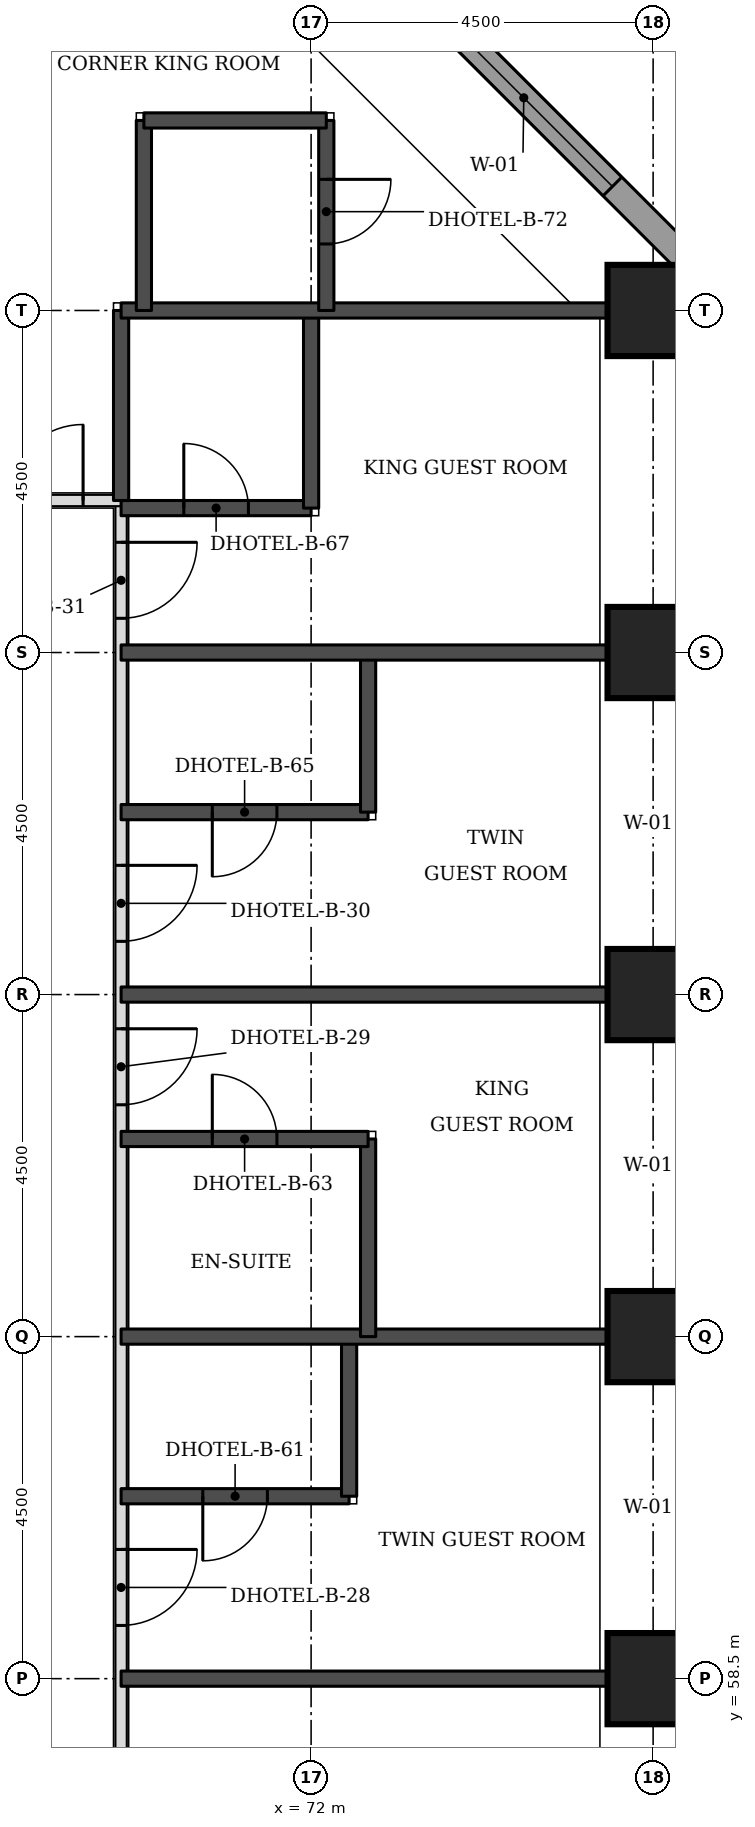
"""IFC4 building model, lengths in metres.
Left out: names, types, materials, properties, quantities, classifications, styles, units other than length and angle.
Written with IfcOpenShell. Run it as: python <this file> out.ifc"""

import sys

from ifc_helpers import new_model, si_unit, direction, frame, frame_2d, origin, origin_2d, place, context, subcontext, project, spatial, rectangle, extrude, element, fill, save


model = new_model("IFC4")
c1 = context("Model", 3, precision=1e-05, world=origin(), true_north=direction((0.0, 1.0)))
c2 = subcontext(c1, "Body", "Model", "MODEL_VIEW")
j1 = project(units=[si_unit("LENGTHUNIT", "METRE"), si_unit("PLANEANGLEUNIT", "RADIAN")], contexts=[c1])
p1 = place(None, origin())
s1 = spatial("IfcSite", under=j1, at=p1, CompositionType="ELEMENT")
p2 = place(p1, origin())
s2 = spatial("IfcBuilding", under=s1, at=p2, CompositionType="ELEMENT")
p3 = place(p2, frame((0.0, 0.0, 52.8)))
s3 = spatial("IfcBuildingStorey", under=s2, at=p3, CompositionType="ELEMENT", Elevation=52.8)
for number, where, z_axis, x_axis in (
    (1, (76.5, 58.5, 0.0), (0.0, 0.0, 1.0), (1.0, 0.0, 0.0)),
    (2, (76.5, 63.0, 0.0), (0.0, 0.0, 1.0), (1.0, 0.0, 0.0)),
    (3, (76.5, 67.5, 0.0), (0.0, 0.0, 1.0), (1.0, 0.0, 0.0)),
    (4, (76.5, 72.0, 0.0), (0.0, 0.0, 1.0), (1.0, 0.0, 0.0)),
    (5, (76.5, 76.5, 0.0), (0.0, 0.0, 1.0), (1.0, 0.0, 0.0)),
):
    element("IfcColumn", number, at=place(p3, frame(where, z_axis=z_axis, x_axis=x_axis)), inside=s3, PredefinedType="COLUMN", context=c2, shape_type="SweptSolid", body=[
        extrude(rectangle(XDim=1.2, YDim=1.2, at=origin_2d()), origin(), (0.0, 0.0, 1.0), 3.3),
    ])
p4 = place(p3, frame((77.326, 76.77, 0.0), z_axis=(0.0, 0.0, 1.0), x_axis=(-0.707106781187, 0.707106781187, 0.0)))
e6 = element("IfcWall", 6, at=p4, inside=s3, PredefinedType="STANDARD", context=c2, shape_type="SweptSolid", body=[
    extrude(rectangle(XDim=7.151, YDim=0.35, at=frame_2d((3.576, 0.0))), origin(), (0.0, 0.0, 1.0), 3.055),
])
p5 = place(p4, frame((1.926, 0.0, 0.8)))
e7 = element("IfcOpeningElement", 7, at=p5, cuts=e6, PredefinedType="OPENING", context=c2, shape_type="SweptSolid", body=[
    extrude(rectangle(XDim=3.3, YDim=1.5, at=frame_2d((1.65, 0.75))), frame((0.0, 0.185, 0.0), z_axis=(0.0, -1.0, 0.0), x_axis=(1.0, 0.0, 0.0)), (0.0, 0.0, 1.0), 0.37),
])
p6 = place(p3, frame((69.5, 47.5, 0.0), z_axis=(0.0, 0.0, 1.0), x_axis=(0.0, 1.0, 0.0)))
e8 = element("IfcWall", 8, at=p6, inside=s3, PredefinedType="PARTITIONING", context=c2, shape_type="SweptSolid", body=[
    extrude(rectangle(XDim=26.5, YDim=0.15, at=frame_2d((13.25, 0.0))), origin(), (0.0, 0.0, 1.0), 3.08),
])
p7 = place(p6, frame((24.95, 0.0, 0.0)))
e9 = element("IfcOpeningElement", 9, at=p7, cuts=e8, PredefinedType="OPENING", context=c2, shape_type="SweptSolid", body=[
    extrude(rectangle(XDim=1.0, YDim=2.1, at=frame_2d((0.5, 1.05))), frame((0.0, 0.085, 0.0), z_axis=(0.0, -1.0, 0.0), x_axis=(1.0, 0.0, 0.0)), (0.0, 0.0, 1.0), 0.17),
])
p8 = place(p6, frame((20.7, 0.0, 0.0)))
e10 = element("IfcOpeningElement", 10, at=p8, cuts=e8, PredefinedType="OPENING", context=c2, shape_type="SweptSolid", body=[
    extrude(rectangle(XDim=1.0, YDim=2.1, at=frame_2d((0.5, 1.05))), frame((0.0, 0.085, 0.0), z_axis=(0.0, -1.0, 0.0), x_axis=(1.0, 0.0, 0.0)), (0.0, 0.0, 1.0), 0.17),
])
p9 = place(p6, frame((18.55, 0.0, 0.0)))
e11 = element("IfcOpeningElement", 11, at=p9, cuts=e8, PredefinedType="OPENING", context=c2, shape_type="SweptSolid", body=[
    extrude(rectangle(XDim=1.0, YDim=2.1, at=frame_2d((0.5, 1.05))), frame((0.0, 0.085, 0.0), z_axis=(0.0, -1.0, 0.0), x_axis=(1.0, 0.0, 0.0)), (0.0, 0.0, 1.0), 0.17),
])
p10 = place(p6, frame((11.7, 0.0, 0.0)))
e12 = element("IfcOpeningElement", 12, at=p10, cuts=e8, PredefinedType="OPENING", context=c2, shape_type="SweptSolid", body=[
    extrude(rectangle(XDim=1.0, YDim=2.1, at=frame_2d((0.5, 1.05))), frame((0.0, 0.085, 0.0), z_axis=(0.0, -1.0, 0.0), x_axis=(1.0, 0.0, 0.0)), (0.0, 0.0, 1.0), 0.17),
])
p11 = place(p6, frame((7.65, 0.0, 0.0)))
e13 = element("IfcOpeningElement", 13, at=p11, cuts=e8, PredefinedType="OPENING", context=c2, shape_type="SweptSolid", body=[
    extrude(rectangle(XDim=1.1, YDim=2.1, at=frame_2d((0.55, 1.05))), frame((0.0, 0.085, 0.0), z_axis=(0.0, -1.0, 0.0), x_axis=(1.0, 0.0, 0.0)), (0.0, 0.0, 1.0), 0.17),
])
p12 = place(p6, frame((0.447, 0.0, 0.0)))
e14 = element("IfcOpeningElement", 14, at=p12, cuts=e8, PredefinedType="OPENING", context=c2, shape_type="SweptSolid", body=[
    extrude(rectangle(XDim=1.0, YDim=2.1, at=frame_2d((0.5, 1.05))), frame((0.0, 0.085, 0.0), z_axis=(0.0, -1.0, 0.0), x_axis=(1.0, 0.0, 0.0)), (0.0, 0.0, 1.0), 0.17),
])
p13 = place(p3, frame((43.0, 74.0, 0.0), z_axis=(0.0, 0.0, 1.0), x_axis=(1.0, 0.0, 0.0)))
e15 = element("IfcWall", 15, at=p13, inside=s3, PredefinedType="PARTITIONING", context=c2, shape_type="SweptSolid", body=[
    extrude(rectangle(XDim=26.5, YDim=0.15, at=frame_2d((13.25, 0.0))), origin(), (0.0, 0.0, 1.0), 3.08),
])
p14 = place(p13, frame((4.65, 0.0, 0.0)))
e16 = element("IfcOpeningElement", 16, at=p14, cuts=e15, PredefinedType="OPENING", context=c2, shape_type="SweptSolid", body=[
    extrude(rectangle(XDim=1.0, YDim=2.1, at=frame_2d((0.5, 1.05))), frame((0.0, 0.085, 0.0), z_axis=(0.0, -1.0, 0.0), x_axis=(1.0, 0.0, 0.0)), (0.0, 0.0, 1.0), 0.17),
])
p15 = place(p13, frame((16.6, 0.0, 0.0)))
e17 = element("IfcOpeningElement", 17, at=p15, cuts=e15, PredefinedType="OPENING", context=c2, shape_type="SweptSolid", body=[
    extrude(rectangle(XDim=1.0, YDim=2.1, at=frame_2d((0.5, 1.05))), frame((0.0, 0.085, 0.0), z_axis=(0.0, -1.0, 0.0), x_axis=(1.0, 0.0, 0.0)), (0.0, 0.0, 1.0), 0.17),
])
p16 = place(p13, frame((20.7, 0.0, 0.0)))
e18 = element("IfcOpeningElement", 18, at=p16, cuts=e15, PredefinedType="OPENING", context=c2, shape_type="SweptSolid", body=[
    extrude(rectangle(XDim=1.0, YDim=2.1, at=frame_2d((0.5, 1.05))), frame((0.0, 0.085, 0.0), z_axis=(0.0, -1.0, 0.0), x_axis=(1.0, 0.0, 0.0)), (0.0, 0.0, 1.0), 0.17),
])
p17 = place(p13, frame((0.5, 0.0, 0.0)))
e19 = element("IfcOpeningElement", 19, at=p17, cuts=e15, PredefinedType="OPENING", context=c2, shape_type="SweptSolid", body=[
    extrude(rectangle(XDim=1.0, YDim=2.1, at=frame_2d((0.5, 1.05))), frame((0.0, 0.085, 0.0), z_axis=(0.0, -1.0, 0.0), x_axis=(1.0, 0.0, 0.0)), (0.0, 0.0, 1.0), 0.17),
])
p18 = place(p13, frame((25.0, 0.0, 0.0)))
e20 = element("IfcOpeningElement", 20, at=p18, cuts=e15, PredefinedType="OPENING", context=c2, shape_type="SweptSolid", body=[
    extrude(rectangle(XDim=1.0, YDim=2.1, at=frame_2d((0.5, 1.05))), frame((0.0, 0.085, 0.0), z_axis=(0.0, -1.0, 0.0), x_axis=(1.0, 0.0, 0.0)), (0.0, 0.0, 1.0), 0.17),
])
p19 = place(p3, frame((69.5, 58.5, 0.0), z_axis=(0.0, 0.0, 1.0), x_axis=(1.0, 0.0, 0.0)))
e21 = element("IfcWall", 21, at=p19, inside=s3, PredefinedType="SOLIDWALL", context=c2, shape_type="SweptSolid", body=[
    extrude(rectangle(XDim=6.4, YDim=0.2, at=frame_2d((3.2, 0.0))), origin(), (0.0, 0.0, 1.0), 3.08),
])
p20 = place(p3, frame((69.5, 60.9, 0.0), z_axis=(0.0, 0.0, 1.0), x_axis=(1.0, 0.0, 0.0)))
e22 = element("IfcWall", 22, at=p20, inside=s3, PredefinedType="SOLIDWALL", context=c2, shape_type="SweptSolid", body=[
    extrude(rectangle(XDim=3.0, YDim=0.2, at=frame_2d((1.5, 0.0))), origin(), (0.0, 0.0, 1.0), 3.08),
])
p21 = place(p20, frame((1.075, 0.0, 0.0)))
e23 = element("IfcOpeningElement", 23, at=p21, cuts=e22, PredefinedType="OPENING", context=c2, shape_type="SweptSolid", body=[
    extrude(rectangle(XDim=0.85, YDim=2.1, at=frame_2d((0.425, 1.05))), frame((0.0, 0.11, 0.0), z_axis=(0.0, -1.0, 0.0), x_axis=(1.0, 0.0, 0.0)), (0.0, 0.0, 1.0), 0.22),
])
p22 = place(p3, frame((72.5, 60.9, 0.0), z_axis=(0.0, 0.0, 1.0), x_axis=(0.0, 1.0, 0.0)))
e24 = element("IfcWall", 24, at=p22, inside=s3, PredefinedType="SOLIDWALL", context=c2, shape_type="SweptSolid", body=[
    extrude(rectangle(XDim=2.1, YDim=0.2, at=frame_2d((1.05, 0.0))), origin(), (0.0, 0.0, 1.0), 3.08),
])
p23 = place(p3, frame((69.5, 63.0, 0.0), z_axis=(0.0, 0.0, 1.0), x_axis=(1.0, 0.0, 0.0)))
e25 = element("IfcWall", 25, at=p23, inside=s3, PredefinedType="SOLIDWALL", context=c2, shape_type="SweptSolid", body=[
    extrude(rectangle(XDim=6.4, YDim=0.2, at=frame_2d((3.2, 0.0))), origin(), (0.0, 0.0, 1.0), 3.08),
])
p24 = place(p3, frame((72.75, 63.0, 0.0), z_axis=(0.0, 0.0, 1.0), x_axis=(0.0, 1.0, 0.0)))
e26 = element("IfcWall", 26, at=p24, inside=s3, PredefinedType="SOLIDWALL", context=c2, shape_type="SweptSolid", body=[
    extrude(rectangle(XDim=2.6, YDim=0.2, at=frame_2d((1.3, 0.0))), origin(), (0.0, 0.0, 1.0), 3.08),
])
p25 = place(p3, frame((69.5, 65.6, 0.0), z_axis=(0.0, 0.0, 1.0), x_axis=(1.0, 0.0, 0.0)))
e27 = element("IfcWall", 27, at=p25, inside=s3, PredefinedType="SOLIDWALL", context=c2, shape_type="SweptSolid", body=[
    extrude(rectangle(XDim=3.25, YDim=0.2, at=frame_2d((1.625, 0.0))), origin(), (0.0, 0.0, 1.0), 3.08),
])
p26 = place(p25, frame((1.2, 0.0, 0.0)))
e28 = element("IfcOpeningElement", 28, at=p26, cuts=e27, PredefinedType="OPENING", context=c2, shape_type="SweptSolid", body=[
    extrude(rectangle(XDim=0.85, YDim=2.1, at=frame_2d((0.425, 1.05))), frame((0.0, 0.11, 0.0), z_axis=(0.0, -1.0, 0.0), x_axis=(1.0, 0.0, 0.0)), (0.0, 0.0, 1.0), 0.22),
])
p27 = place(p3, frame((69.5, 67.5, 0.0), z_axis=(0.0, 0.0, 1.0), x_axis=(1.0, 0.0, 0.0)))
e29 = element("IfcWall", 29, at=p27, inside=s3, PredefinedType="SOLIDWALL", context=c2, shape_type="SweptSolid", body=[
    extrude(rectangle(XDim=6.4, YDim=0.2, at=frame_2d((3.2, 0.0))), origin(), (0.0, 0.0, 1.0), 3.08),
])
p28 = place(p3, frame((69.5, 69.9, 0.0), z_axis=(0.0, 0.0, 1.0), x_axis=(1.0, 0.0, 0.0)))
e30 = element("IfcWall", 30, at=p28, inside=s3, PredefinedType="SOLIDWALL", context=c2, shape_type="SweptSolid", body=[
    extrude(rectangle(XDim=3.25, YDim=0.2, at=frame_2d((1.625, 0.0))), origin(), (0.0, 0.0, 1.0), 3.08),
])
p29 = place(p28, frame((1.2, 0.0, 0.0)))
e31 = element("IfcOpeningElement", 31, at=p29, cuts=e30, PredefinedType="OPENING", context=c2, shape_type="SweptSolid", body=[
    extrude(rectangle(XDim=0.85, YDim=2.1, at=frame_2d((0.425, 1.05))), frame((0.0, 0.11, 0.0), z_axis=(0.0, -1.0, 0.0), x_axis=(1.0, 0.0, 0.0)), (0.0, 0.0, 1.0), 0.22),
])
p30 = place(p3, frame((72.75, 69.9, 0.0), z_axis=(0.0, 0.0, 1.0), x_axis=(0.0, 1.0, 0.0)))
e32 = element("IfcWall", 32, at=p30, inside=s3, PredefinedType="SOLIDWALL", context=c2, shape_type="SweptSolid", body=[
    extrude(rectangle(XDim=2.1, YDim=0.2, at=frame_2d((1.05, 0.0))), origin(), (0.0, 0.0, 1.0), 3.08),
])
p31 = place(p3, frame((69.5, 72.0, 0.0), z_axis=(0.0, 0.0, 1.0), x_axis=(1.0, 0.0, 0.0)))
e33 = element("IfcWall", 33, at=p31, inside=s3, PredefinedType="SOLIDWALL", context=c2, shape_type="SweptSolid", body=[
    extrude(rectangle(XDim=6.4, YDim=0.2, at=frame_2d((3.2, 0.0))), origin(), (0.0, 0.0, 1.0), 3.08),
])
p32 = place(p3, frame((69.5, 73.9, 0.0), z_axis=(0.0, 0.0, 1.0), x_axis=(1.0, 0.0, 0.0)))
e34 = element("IfcWall", 34, at=p32, inside=s3, PredefinedType="SOLIDWALL", context=c2, shape_type="SweptSolid", body=[
    extrude(rectangle(XDim=2.5, YDim=0.2, at=frame_2d((1.25, 0.0))), origin(), (0.0, 0.0, 1.0), 3.08),
])
p33 = place(p32, frame((0.825, 0.0, 0.0)))
e35 = element("IfcOpeningElement", 35, at=p33, cuts=e34, PredefinedType="OPENING", context=c2, shape_type="SweptSolid", body=[
    extrude(rectangle(XDim=0.85, YDim=2.1, at=frame_2d((0.425, 1.05))), frame((0.0, 0.11, 0.0), z_axis=(0.0, -1.0, 0.0), x_axis=(1.0, 0.0, 0.0)), (0.0, 0.0, 1.0), 0.22),
])
p34 = place(p3, frame((72.0, 73.9, 0.0), z_axis=(0.0, 0.0, 1.0), x_axis=(0.0, 1.0, 0.0)))
e36 = element("IfcWall", 36, at=p34, inside=s3, PredefinedType="SOLIDWALL", context=c2, shape_type="SweptSolid", body=[
    extrude(rectangle(XDim=2.6, YDim=0.2, at=frame_2d((1.3, 0.0))), origin(), (0.0, 0.0, 1.0), 3.08),
])
p35 = place(p3, frame((69.5, 74.0, 0.0), z_axis=(0.0, 0.0, 1.0), x_axis=(0.0, 1.0, 0.0)))
e37 = element("IfcWall", 37, at=p35, inside=s3, PredefinedType="SOLIDWALL", context=c2, shape_type="SweptSolid", body=[
    extrude(rectangle(XDim=2.5, YDim=0.2, at=frame_2d((1.25, 0.0))), origin(), (0.0, 0.0, 1.0), 3.08),
])
p36 = place(p3, frame((69.5, 76.5, 0.0), z_axis=(0.0, 0.0, 1.0), x_axis=(1.0, 0.0, 0.0)))
e38 = element("IfcWall", 38, at=p36, inside=s3, PredefinedType="SOLIDWALL", context=c2, shape_type="SweptSolid", body=[
    extrude(rectangle(XDim=6.4, YDim=0.2, at=frame_2d((3.2, 0.0))), origin(), (0.0, 0.0, 1.0), 3.08),
])
p37 = place(p3, frame((69.8, 76.5, 0.0), z_axis=(0.0, 0.0, 1.0), x_axis=(0.0, 1.0, 0.0)))
e39 = element("IfcWall", 39, at=p37, inside=s3, PredefinedType="SOLIDWALL", context=c2, shape_type="SweptSolid", body=[
    extrude(rectangle(XDim=2.5, YDim=0.2, at=frame_2d((1.25, 0.0))), origin(), (0.0, 0.0, 1.0), 3.08),
])
p38 = place(p3, frame((72.2, 76.5, 0.0), z_axis=(0.0, 0.0, 1.0), x_axis=(0.0, 1.0, 0.0)))
e40 = element("IfcWall", 40, at=p38, inside=s3, PredefinedType="SOLIDWALL", context=c2, shape_type="SweptSolid", body=[
    extrude(rectangle(XDim=2.5, YDim=0.2, at=frame_2d((1.25, 0.0))), origin(), (0.0, 0.0, 1.0), 3.08),
])
p39 = place(p38, frame((0.875, 0.0, 0.0)))
e41 = element("IfcOpeningElement", 41, at=p39, cuts=e40, PredefinedType="OPENING", context=c2, shape_type="SweptSolid", body=[
    extrude(rectangle(XDim=0.85, YDim=2.1, at=frame_2d((0.425, 1.05))), frame((0.0, 0.11, 0.0), z_axis=(0.0, -1.0, 0.0), x_axis=(1.0, 0.0, 0.0)), (0.0, 0.0, 1.0), 0.22),
])
p40 = place(p3, frame((69.8, 79.0, 0.0), z_axis=(0.0, 0.0, 1.0), x_axis=(1.0, 0.0, 0.0)))
e42 = element("IfcWall", 42, at=p40, inside=s3, PredefinedType="SOLIDWALL", context=c2, shape_type="SweptSolid", body=[
    extrude(rectangle(XDim=2.4, YDim=0.2, at=frame_2d((1.2, 0.0))), origin(), (0.0, 0.0, 1.0), 3.08),
])
p41 = place(p5, origin())
e43 = element("IfcWindow", 43, at=p41, inside=s3, PartitioningType="SINGLE_PANEL", PredefinedType="WINDOW", context=c2, shape_type="SweptSolid", body=[
    extrude(rectangle(XDim=3.3, YDim=1.5, at=frame_2d((1.65, 0.75))), frame((0.0, 0.085, 0.0), z_axis=(0.0, -1.0, 0.0), x_axis=(1.0, 0.0, 0.0)), (0.0, 0.0, 1.0), 0.06),
])
fill(e7, e43)
p42 = place(p7, frame((1.0, 0.0, 0.0), z_axis=(0.0, 0.0, 1.0), x_axis=(-1.0, 0.0, 0.0)))
e44 = element("IfcDoor", 44, at=p42, inside=s3, OperationType="SINGLE_SWING_LEFT", PredefinedType="DOOR", context=c2, shape_type="SweptSolid", body=[
    extrude(rectangle(XDim=1.0, YDim=2.1, at=frame_2d((0.5, 1.05))), frame((0.0, 0.025, 0.0), z_axis=(0.0, -1.0, 0.0), x_axis=(1.0, 0.0, 0.0)), (0.0, 0.0, 1.0), 0.05),
])
fill(e9, e44)
p43 = place(p33, origin())
e45 = element("IfcDoor", 45, at=p43, inside=s3, OperationType="SINGLE_SWING_LEFT", PredefinedType="DOOR", context=c2, shape_type="SweptSolid", body=[
    extrude(rectangle(XDim=0.85, YDim=2.1, at=frame_2d((0.425, 1.05))), frame((0.0, 0.025, 0.0), z_axis=(0.0, -1.0, 0.0), x_axis=(1.0, 0.0, 0.0)), (0.0, 0.0, 1.0), 0.05),
])
fill(e35, e45)
p44 = place(p8, frame((1.0, 0.0, 0.0), z_axis=(0.0, 0.0, 1.0), x_axis=(-1.0, 0.0, 0.0)))
e46 = element("IfcDoor", 46, at=p44, inside=s3, OperationType="SINGLE_SWING_LEFT", PredefinedType="DOOR", context=c2, shape_type="SweptSolid", body=[
    extrude(rectangle(XDim=1.0, YDim=2.1, at=frame_2d((0.5, 1.05))), frame((0.0, 0.025, 0.0), z_axis=(0.0, -1.0, 0.0), x_axis=(1.0, 0.0, 0.0)), (0.0, 0.0, 1.0), 0.05),
])
fill(e10, e46)
p45 = place(p29, frame((0.85, 0.0, 0.0), z_axis=(0.0, 0.0, 1.0), x_axis=(-1.0, 0.0, 0.0)))
e47 = element("IfcDoor", 47, at=p45, inside=s3, OperationType="SINGLE_SWING_RIGHT", PredefinedType="DOOR", context=c2, shape_type="SweptSolid", body=[
    extrude(rectangle(XDim=0.85, YDim=2.1, at=frame_2d((0.425, 1.05))), frame((0.0, 0.025, 0.0), z_axis=(0.0, -1.0, 0.0), x_axis=(1.0, 0.0, 0.0)), (0.0, 0.0, 1.0), 0.05),
])
fill(e31, e47)
p46 = place(p9, frame((1.0, 0.0, 0.0), z_axis=(0.0, 0.0, 1.0), x_axis=(-1.0, 0.0, 0.0)))
e48 = element("IfcDoor", 48, at=p46, inside=s3, OperationType="SINGLE_SWING_LEFT", PredefinedType="DOOR", context=c2, shape_type="SweptSolid", body=[
    extrude(rectangle(XDim=1.0, YDim=2.1, at=frame_2d((0.5, 1.05))), frame((0.0, 0.025, 0.0), z_axis=(0.0, -1.0, 0.0), x_axis=(1.0, 0.0, 0.0)), (0.0, 0.0, 1.0), 0.05),
])
fill(e11, e48)
p47 = place(p26, origin())
e49 = element("IfcDoor", 49, at=p47, inside=s3, OperationType="SINGLE_SWING_LEFT", PredefinedType="DOOR", context=c2, shape_type="SweptSolid", body=[
    extrude(rectangle(XDim=0.85, YDim=2.1, at=frame_2d((0.425, 1.05))), frame((0.0, 0.025, 0.0), z_axis=(0.0, -1.0, 0.0), x_axis=(1.0, 0.0, 0.0)), (0.0, 0.0, 1.0), 0.05),
])
fill(e28, e49)
p48 = place(p10, frame((1.0, 0.0, 0.0), z_axis=(0.0, 0.0, 1.0), x_axis=(-1.0, 0.0, 0.0)))
e50 = element("IfcDoor", 50, at=p48, inside=s3, OperationType="SINGLE_SWING_LEFT", PredefinedType="DOOR", context=c2, shape_type="SweptSolid", body=[
    extrude(rectangle(XDim=1.0, YDim=2.1, at=frame_2d((0.5, 1.05))), frame((0.0, 0.025, 0.0), z_axis=(0.0, -1.0, 0.0), x_axis=(1.0, 0.0, 0.0)), (0.0, 0.0, 1.0), 0.05),
])
fill(e12, e50)
p49 = place(p21, frame((0.85, 0.0, 0.0), z_axis=(0.0, 0.0, 1.0), x_axis=(-1.0, 0.0, 0.0)))
e51 = element("IfcDoor", 51, at=p49, inside=s3, OperationType="SINGLE_SWING_RIGHT", PredefinedType="DOOR", context=c2, shape_type="SweptSolid", body=[
    extrude(rectangle(XDim=0.85, YDim=2.1, at=frame_2d((0.425, 1.05))), frame((0.0, 0.025, 0.0), z_axis=(0.0, -1.0, 0.0), x_axis=(1.0, 0.0, 0.0)), (0.0, 0.0, 1.0), 0.05),
])
fill(e23, e51)
p50 = place(p18, origin())
e52 = element("IfcDoor", 52, at=p50, inside=s3, OperationType="SINGLE_SWING_RIGHT", PredefinedType="DOOR", context=c2, shape_type="SweptSolid", body=[
    extrude(rectangle(XDim=1.0, YDim=2.1, at=frame_2d((0.5, 1.05))), frame((0.0, 0.025, 0.0), z_axis=(0.0, -1.0, 0.0), x_axis=(1.0, 0.0, 0.0)), (0.0, 0.0, 1.0), 0.05),
])
fill(e20, e52)
p51 = place(p39, frame((0.85, 0.0, 0.0), z_axis=(0.0, 0.0, 1.0), x_axis=(-1.0, 0.0, 0.0)))
e53 = element("IfcDoor", 53, at=p51, inside=s3, OperationType="SINGLE_SWING_LEFT", PredefinedType="DOOR", context=c2, shape_type="SweptSolid", body=[
    extrude(rectangle(XDim=0.85, YDim=2.1, at=frame_2d((0.425, 1.05))), frame((0.0, 0.025, 0.0), z_axis=(0.0, -1.0, 0.0), x_axis=(1.0, 0.0, 0.0)), (0.0, 0.0, 1.0), 0.05),
])
fill(e41, e53)
save(model, sys.argv[1])
